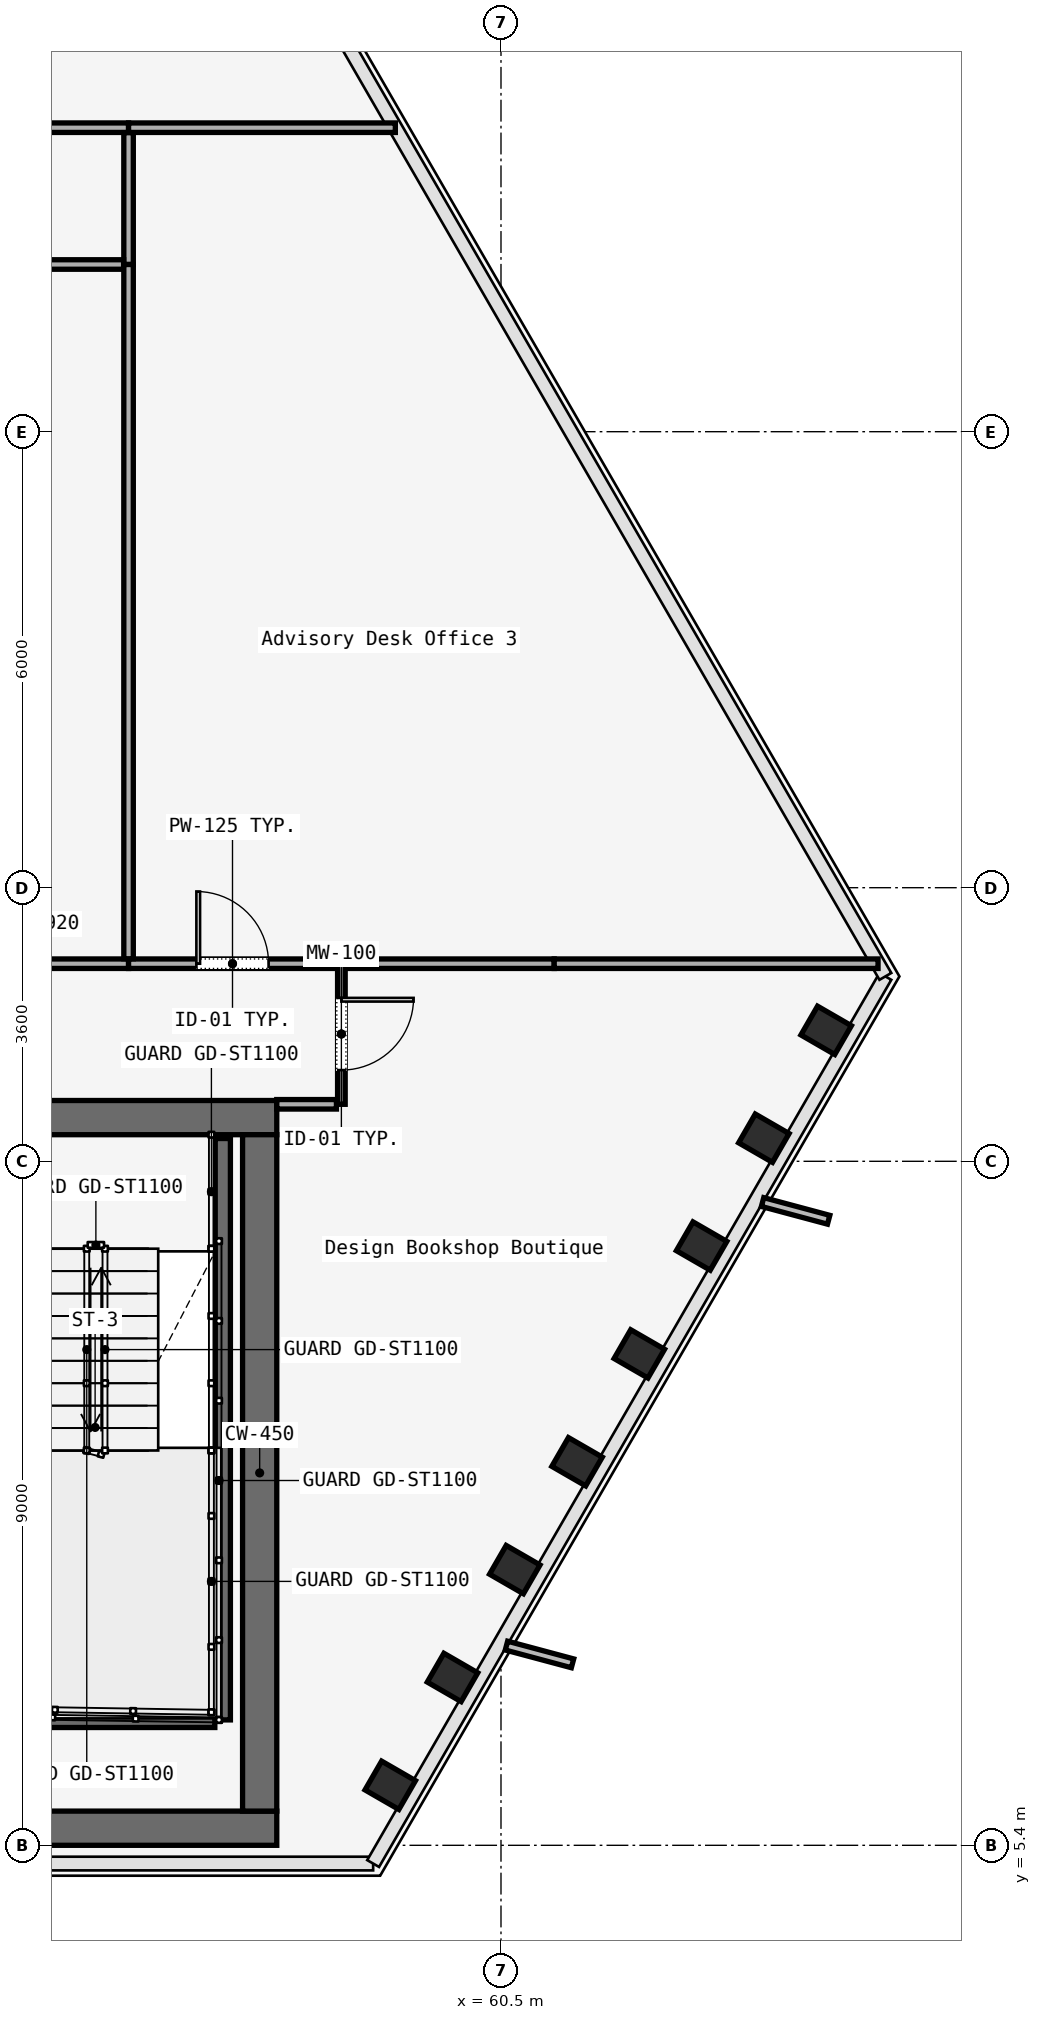
"""IFC4 building model, lengths in metres.
Left out: names, types, materials, properties, quantities, classifications, styles, units other than length and angle.
Written with IfcOpenShell. Run it as: python <this file> out.ifc"""

import sys

from ifc_helpers import new_model, si_unit, direction, frame, frame_2d, origin, origin_2d, place, context, subcontext, project, spatial, rectangle, i_section, extrude, element, fill, save


model = new_model("IFC4")
c1 = context("Model", 3, precision=1e-05, world=origin(), true_north=direction((0.0, 1.0)))
c2 = subcontext(c1, "Body", "Model", "MODEL_VIEW")
j1 = project(units=[si_unit("LENGTHUNIT", "METRE"), si_unit("PLANEANGLEUNIT", "RADIAN")], contexts=[c1])
p1 = place(None, origin())
s1 = spatial("IfcSite", under=j1, at=p1, CompositionType="ELEMENT")
p2 = place(p1, origin())
s2 = spatial("IfcBuilding", under=s1, at=p2, CompositionType="ELEMENT")
p3 = place(p2, frame((0.0, 0.0, 108.2)))
s3 = spatial("IfcBuildingStorey", under=s2, at=p3, CompositionType="ELEMENT", Elevation=108.2)
p4 = place(p3, frame((26.45, 14.975, 0.0), z_axis=(0.0, 0.0, 1.0), x_axis=(1.0, 0.0, 0.0)))
e1 = element("IfcWall", 1, at=p4, inside=s3, PredefinedType="SOLIDWALL", context=c2, shape_type="SweptSolid", body=[
    extrude(rectangle(XDim=31.1, YDim=0.45, at=frame_2d((15.55, 0.0))), origin(), (0.0, 0.0, 1.0), 3.52),
])
p5 = place(p4, frame((1.65, 0.0, 0.0)))
e2 = element("IfcOpeningElement", 2, at=p5, cuts=e1, PredefinedType="OPENING", context=c2, shape_type="SweptSolid", body=[
    extrude(rectangle(XDim=1.1, YDim=2.2, at=frame_2d((0.55, 1.1))), frame((0.0, 0.225, 0.0), z_axis=(0.0, -1.0, 0.0), x_axis=(1.0, 0.0, 0.0)), (0.0, 0.0, 1.0), 0.45),
])
p6 = place(p4, frame((13.65, 0.0, 0.0)))
e3 = element("IfcOpeningElement", 3, at=p6, cuts=e1, PredefinedType="OPENING", context=c2, shape_type="SweptSolid", body=[
    extrude(rectangle(XDim=1.1, YDim=2.2, at=frame_2d((0.55, 1.1))), frame((0.0, 0.225, 0.0), z_axis=(0.0, -1.0, 0.0), x_axis=(1.0, 0.0, 0.0)), (0.0, 0.0, 1.0), 0.45),
])
p7 = place(p4, frame((25.55, 0.0, 0.0)))
e4 = element("IfcOpeningElement", 4, at=p7, cuts=e1, PredefinedType="OPENING", context=c2, shape_type="SweptSolid", body=[
    extrude(rectangle(XDim=1.1, YDim=2.2, at=frame_2d((0.55, 1.1))), frame((0.0, 0.225, 0.0), z_axis=(0.0, -1.0, 0.0), x_axis=(1.0, 0.0, 0.0)), (0.0, 0.0, 1.0), 0.45),
])
p8 = place(p4, frame((10.7, 0.0, 0.0)))
e5 = element("IfcOpeningElement", 5, at=p8, cuts=e1, PredefinedType="OPENING", context=c2, shape_type="SweptSolid", body=[
    extrude(rectangle(XDim=1.4, YDim=2.2, at=frame_2d((0.7, 1.1))), frame((0.0, 0.225, 0.0), z_axis=(0.0, -1.0, 0.0), x_axis=(1.0, 0.0, 0.0)), (0.0, 0.0, 1.0), 0.45),
])
p9 = place(p4, frame((19.35, 0.0, 0.0)))
e6 = element("IfcOpeningElement", 6, at=p9, cuts=e1, PredefinedType="OPENING", context=c2, shape_type="SweptSolid", body=[
    extrude(rectangle(XDim=1.1, YDim=2.2, at=frame_2d((0.55, 1.1))), frame((0.0, 0.225, 0.0), z_axis=(0.0, -1.0, 0.0), x_axis=(1.0, 0.0, 0.0)), (0.0, 0.0, 1.0), 0.45),
])
p10 = place(p4, frame((21.4, 0.0, 0.0)))
e7 = element("IfcOpeningElement", 7, at=p10, cuts=e1, PredefinedType="OPENING", context=c2, shape_type="SweptSolid", body=[
    extrude(rectangle(XDim=0.9, YDim=2.1, at=frame_2d((0.45, 1.05))), frame((0.0, 0.225, 0.0), z_axis=(0.0, -1.0, 0.0), x_axis=(1.0, 0.0, 0.0)), (0.0, 0.0, 1.0), 0.45),
])
p11 = place(p4, frame((23.35, 0.0, 0.0)))
e8 = element("IfcOpeningElement", 8, at=p11, cuts=e1, PredefinedType="OPENING", context=c2, shape_type="SweptSolid", body=[
    extrude(rectangle(XDim=1.3, YDim=2.3, at=frame_2d((0.65, 1.15))), frame((0.0, 0.225, 0.0), z_axis=(0.0, -1.0, 0.0), x_axis=(1.0, 0.0, 0.0)), (0.0, 0.0, 1.0), 0.45),
])
p12 = place(p3, frame((26.45, 5.625, 0.0), z_axis=(0.0, 0.0, 1.0), x_axis=(1.0, 0.0, 0.0)))
e9 = element("IfcWall", 9, at=p12, inside=s3, PredefinedType="SOLIDWALL", context=c2, shape_type="SweptSolid", body=[
    extrude(rectangle(XDim=31.1, YDim=0.45, at=frame_2d((15.55, 0.0))), origin(), (0.0, 0.0, 1.0), 3.52),
])
p13 = place(p3, frame((57.325, 5.85, 0.0), z_axis=(0.0, 0.0, 1.0), x_axis=(0.0, 1.0, 0.0)))
e10 = element("IfcWall", 10, at=p13, inside=s3, PredefinedType="SOLIDWALL", context=c2, shape_type="SweptSolid", body=[
    extrude(rectangle(XDim=8.9, YDim=0.45, at=frame_2d((4.45, 0.0))), origin(), (0.0, 0.0, 1.0), 3.52),
])
p14 = place(p3, frame((59.043, 6.19, 0.0), z_axis=(0.110900524315, -0.011717271059, 0.993762436031), x_axis=(-0.803324310998, 0.587658817519, 0.096577251725)))
e11 = element("IfcColumn", 11, at=p14, inside=s3, PredefinedType="COLUMN", context=c2, shape_type="SweptSolid", body=[
    extrude(i_section(OverallWidth=0.437, OverallDepth=0.514, WebThickness=0.061, FlangeThickness=0.077, FilletRadius=0.015, at=origin_2d()), origin(), (0.0, 0.0, 1.0), 3.542),
])
p15 = place(p3, frame((59.862, 7.609, 0.0), z_axis=(0.0975438825, -0.034975069609, 0.994616476584), x_axis=(-0.642059401793, 0.761384381367, 0.089741564398)))
e12 = element("IfcColumn", 12, at=p15, inside=s3, PredefinedType="COLUMN", context=c2, shape_type="SweptSolid", body=[
    extrude(i_section(OverallWidth=0.437, OverallDepth=0.514, WebThickness=0.061, FlangeThickness=0.077, FilletRadius=0.015, at=origin_2d()), origin(), (0.0, 0.0, 1.0), 3.539),
])
p16 = place(p3, frame((60.682, 9.028, 0.0), z_axis=(0.084102893328, -0.058368373876, 0.994746116487), x_axis=(-0.422655646103, 0.901943502674, 0.088657333601)))
e13 = element("IfcColumn", 13, at=p16, inside=s3, PredefinedType="COLUMN", context=c2, shape_type="SweptSolid", body=[
    extrude(i_section(OverallWidth=0.437, OverallDepth=0.514, WebThickness=0.061, FlangeThickness=0.077, FilletRadius=0.015, at=origin_2d()), origin(), (0.0, 0.0, 1.0), 3.539),
])
p17 = place(p3, frame((61.501, 10.447, 0.0), z_axis=(0.070539187226, -0.081571709177, 0.994168134335), x_axis=(-0.184962847844, 0.97829773301, 0.093393203738)))
e14 = element("IfcColumn", 14, at=p17, inside=s3, PredefinedType="COLUMN", context=c2, shape_type="SweptSolid", body=[
    extrude(i_section(OverallWidth=0.437, OverallDepth=0.514, WebThickness=0.061, FlangeThickness=0.077, FilletRadius=0.015, at=origin_2d()), origin(), (0.0, 0.0, 1.0), 3.541),
])
p18 = place(p3, frame((62.32, 11.866, 0.0), z_axis=(0.057018391057, -0.104740305311, 0.992863722534), x_axis=(0.028033854461, 0.994257452397, 0.103277400028)))
e15 = element("IfcColumn", 15, at=p18, inside=s3, PredefinedType="COLUMN", context=c2, shape_type="SweptSolid", body=[
    extrude(i_section(OverallWidth=0.437, OverallDepth=0.514, WebThickness=0.061, FlangeThickness=0.077, FilletRadius=0.015, at=origin_2d()), origin(), (0.0, 0.0, 1.0), 3.545),
])
p19 = place(p3, frame((63.139, 13.285, 0.0), z_axis=(0.043570760705, -0.127688443832, 0.990856826249), x_axis=(0.196088913987, 0.973600059267, 0.116842040411)))
e16 = element("IfcColumn", 16, at=p19, inside=s3, PredefinedType="COLUMN", context=c2, shape_type="SweptSolid", body=[
    extrude(i_section(OverallWidth=0.437, OverallDepth=0.514, WebThickness=0.061, FlangeThickness=0.077, FilletRadius=0.015, at=origin_2d()), origin(), (0.0, 0.0, 1.0), 3.552),
])
p20 = place(p3, frame((63.959, 14.704, 0.0), z_axis=(0.030086971203, -0.1505719265, 0.988141118016), x_axis=(0.322626983526, 0.937138720434, 0.132976870788)))
e17 = element("IfcColumn", 17, at=p20, inside=s3, PredefinedType="COLUMN", context=c2, shape_type="SweptSolid", body=[
    extrude(i_section(OverallWidth=0.437, OverallDepth=0.514, WebThickness=0.061, FlangeThickness=0.077, FilletRadius=0.015, at=origin_2d()), origin(), (0.0, 0.0, 1.0), 3.562),
])
p21 = place(p3, frame((64.778, 16.123, 0.0), z_axis=(0.016597028871, -0.173141844397, 0.984757046358), x_axis=(0.416341492097, 0.896643514571, 0.150632565325)))
e18 = element("IfcColumn", 18, at=p21, inside=s3, PredefinedType="COLUMN", context=c2, shape_type="SweptSolid", body=[
    extrude(i_section(OverallWidth=0.437, OverallDepth=0.514, WebThickness=0.061, FlangeThickness=0.077, FilletRadius=0.015, at=origin_2d()), origin(), (0.0, 0.0, 1.0), 3.574),
])
p22 = place(p3, frame((56.84, 14.7, 0.0), z_axis=(0.0, 0.0, 1.0), x_axis=(0.0, -1.0, 0.0)))
e19 = element("IfcWall", 19, at=p22, inside=s3, PredefinedType="SOLIDWALL", context=c2, shape_type="SweptSolid", body=[
    extrude(rectangle(XDim=7.65, YDim=0.2, at=frame_2d((3.825, 0.0))), origin(), (0.0, 0.0, 1.0), 3.8),
])
p23 = place(p3, frame((53.62, 7.05, 0.0), z_axis=(0.0, 0.0, 1.0), x_axis=(1.0, 0.0, 0.0)))
e20 = element("IfcWall", 20, at=p23, inside=s3, PredefinedType="SOLIDWALL", context=c2, shape_type="SweptSolid", body=[
    extrude(rectangle(XDim=3.115, YDim=0.2, at=frame_2d((1.558, 0.0))), origin(), (0.0, 0.0, 1.0), 3.8),
])
p24 = place(p3, frame((58.4, 17.0, 0.0), z_axis=(0.0, 0.0, 1.0), x_axis=(0.0, -1.0, 0.0)))
e21 = element("IfcWall", 21, at=p24, inside=s3, PredefinedType="MOVABLE", context=c2, shape_type="SweptSolid", body=[
    extrude(rectangle(XDim=1.85, YDim=0.1, at=frame_2d((0.925, 0.0))), origin(), (0.0, 0.0, 1.0), 2.95),
])
p25 = place(p24, frame((0.45, 0.0, 0.0)))
e22 = element("IfcOpeningElement", 22, at=p25, cuts=e21, PredefinedType="OPENING", context=c2, shape_type="SweptSolid", body=[
    extrude(rectangle(XDim=0.95, YDim=2.2, at=frame_2d((0.475, 1.1))), frame((0.0, 0.05, 0.0), z_axis=(0.0, -1.0, 0.0), x_axis=(1.0, 0.0, 0.0)), (0.0, 0.0, 1.0), 0.1),
])
p26 = place(p3, frame((58.335, 15.15, 0.0), z_axis=(0.0, 0.0, 1.0), x_axis=(-1.0, 0.0, 0.0)))
e23 = element("IfcWall", 23, at=p26, inside=s3, PredefinedType="PARTITIONING", context=c2, shape_type="SweptSolid", body=[
    extrude(rectangle(XDim=0.785, YDim=0.125, at=frame_2d((0.393, 0.0))), origin(), (0.0, 0.0, 1.0), 2.95),
])
p27 = place(p3, frame((49.4, 28.0, 0.0), z_axis=(0.0, 0.0, 1.0), x_axis=(1.0, 0.0, 0.0)))
e24 = element("IfcWall", 24, at=p27, inside=s3, PredefinedType="PARTITIONING", context=c2, shape_type="SweptSolid", body=[
    extrude(rectangle(XDim=6.2, YDim=0.125, at=frame_2d((3.1, 0.0))), origin(), (0.0, 0.0, 1.0), 2.95),
])
p28 = place(p27, frame((2.625, 0.0, 0.0)))
e25 = element("IfcOpeningElement", 25, at=p28, cuts=e24, PredefinedType="OPENING", context=c2, shape_type="SweptSolid", body=[
    extrude(rectangle(XDim=0.95, YDim=2.2, at=frame_2d((0.475, 1.1))), frame((0.0, 0.062, 0.0), z_axis=(0.0, -1.0, 0.0), x_axis=(1.0, 0.0, 0.0)), (0.0, 0.0, 1.0), 0.125),
])
p29 = place(p3, frame((55.6, 27.935, 0.0), z_axis=(0.0, 0.0, 1.0), x_axis=(0.0, -1.0, 0.0)))
e26 = element("IfcWall", 26, at=p29, inside=s3, PredefinedType="PARTITIONING", context=c2, shape_type="SweptSolid", body=[
    extrude(rectangle(XDim=1.735, YDim=0.125, at=frame_2d((0.868, 0.0))), origin(), (0.0, 0.0, 1.0), 2.95),
])
p30 = place(p3, frame((55.535, 26.2, 0.0), z_axis=(0.0, 0.0, 1.0), x_axis=(-1.0, 0.0, 0.0)))
e27 = element("IfcWall", 27, at=p30, inside=s3, PredefinedType="PARTITIONING", context=c2, shape_type="SweptSolid", body=[
    extrude(rectangle(XDim=10.759, YDim=0.125, at=frame_2d((5.379, 0.0))), origin(), (0.0, 0.0, 1.0), 2.95),
])
p31 = place(p3, frame((44.776, 17.0, 0.0), z_axis=(0.0, 0.0, 1.0), x_axis=(1.0, 0.0, 0.0)))
e28 = element("IfcWall", 28, at=p31, inside=s3, PredefinedType="PARTITIONING", context=c2, shape_type="SweptSolid", body=[
    extrude(rectangle(XDim=10.824, YDim=0.125, at=frame_2d((5.412, 0.0))), origin(), (0.0, 0.0, 1.0), 2.95),
])
p32 = place(p31, frame((4.937, 0.0, 0.0)))
e29 = element("IfcOpeningElement", 29, at=p32, cuts=e28, PredefinedType="OPENING", context=c2, shape_type="SweptSolid", body=[
    extrude(rectangle(XDim=0.95, YDim=2.2, at=frame_2d((0.475, 1.1))), frame((0.0, 0.062, 0.0), z_axis=(0.0, -1.0, 0.0), x_axis=(1.0, 0.0, 0.0)), (0.0, 0.0, 1.0), 0.125),
])
p33 = place(p3, frame((55.6, 17.0, 0.0), z_axis=(0.0, 0.0, 1.0), x_axis=(1.0, 0.0, 0.0)))
e30 = element("IfcWall", 30, at=p33, inside=s3, PredefinedType="PARTITIONING", context=c2, shape_type="SweptSolid", body=[
    extrude(rectangle(XDim=2.735, YDim=0.125, at=frame_2d((1.367, 0.0))), origin(), (0.0, 0.0, 1.0), 2.95),
])
p34 = place(p33, frame((0.893, 0.0, 0.0)))
e31 = element("IfcOpeningElement", 31, at=p34, cuts=e30, PredefinedType="OPENING", context=c2, shape_type="SweptSolid", body=[
    extrude(rectangle(XDim=0.95, YDim=2.2, at=frame_2d((0.475, 1.1))), frame((0.0, 0.062, 0.0), z_axis=(0.0, -1.0, 0.0), x_axis=(1.0, 0.0, 0.0)), (0.0, 0.0, 1.0), 0.125),
])
p35 = place(p3, frame((58.465, 17.0, 0.0), z_axis=(0.0, 0.0, 1.0), x_axis=(1.0, 0.0, 0.0)))
e32 = element("IfcWall", 32, at=p35, inside=s3, PredefinedType="PARTITIONING", context=c2, shape_type="SweptSolid", body=[
    extrude(rectangle(XDim=2.735, YDim=0.125, at=frame_2d((1.367, 0.0))), origin(), (0.0, 0.0, 1.0), 2.95),
])
p36 = place(p3, frame((61.2, 17.0, 0.0), z_axis=(0.0, 0.0, 1.0), x_axis=(1.0, 0.0, 0.0)))
e33 = element("IfcWall", 33, at=p36, inside=s3, PredefinedType="PARTITIONING", context=c2, shape_type="SweptSolid", body=[
    extrude(rectangle(XDim=4.261, YDim=0.125, at=frame_2d((2.13, 0.0))), origin(), (0.0, 0.0, 1.0), 2.95),
])
p37 = place(p3, frame((55.6, 26.2, 0.0), z_axis=(0.0, 0.0, 1.0), x_axis=(0.0, -1.0, 0.0)))
e34 = element("IfcWall", 34, at=p37, inside=s3, PredefinedType="PARTITIONING", context=c2, shape_type="SweptSolid", body=[
    extrude(rectangle(XDim=9.135, YDim=0.125, at=frame_2d((4.567, 0.0))), origin(), (0.0, 0.0, 1.0), 2.95),
])
p38 = place(p3, frame((55.6, 28.0, 0.0), z_axis=(0.0, 0.0, 1.0), x_axis=(1.0, 0.0, 0.0)))
e35 = element("IfcWall", 35, at=p38, inside=s3, PredefinedType="PARTITIONING", context=c2, shape_type="SweptSolid", body=[
    extrude(rectangle(XDim=3.51, YDim=0.125, at=frame_2d((1.755, 0.0))), origin(), (0.0, 0.0, 1.0), 2.95),
])
p39 = place(p25, origin())
e36 = element("IfcDoor", 36, at=p39, inside=s3, OperationType="SINGLE_SWING_LEFT", PredefinedType="DOOR", context=c2, shape_type="SweptSolid", body=[
    extrude(rectangle(XDim=0.95, YDim=2.2, at=frame_2d((0.475, 1.1))), frame((0.0, 0.025, 0.0), z_axis=(0.0, -1.0, 0.0), x_axis=(1.0, 0.0, 0.0)), (0.0, 0.0, 1.0), 0.05),
])
fill(e22, e36)
p40 = place(p34, origin())
e37 = element("IfcDoor", 37, at=p40, inside=s3, OperationType="SINGLE_SWING_RIGHT", PredefinedType="DOOR", context=c2, shape_type="SweptSolid", body=[
    extrude(rectangle(XDim=0.95, YDim=2.2, at=frame_2d((0.475, 1.1))), frame((0.0, 0.025, 0.0), z_axis=(0.0, -1.0, 0.0), x_axis=(1.0, 0.0, 0.0)), (0.0, 0.0, 1.0), 0.05),
])
fill(e31, e37)
save(model, sys.argv[1])
